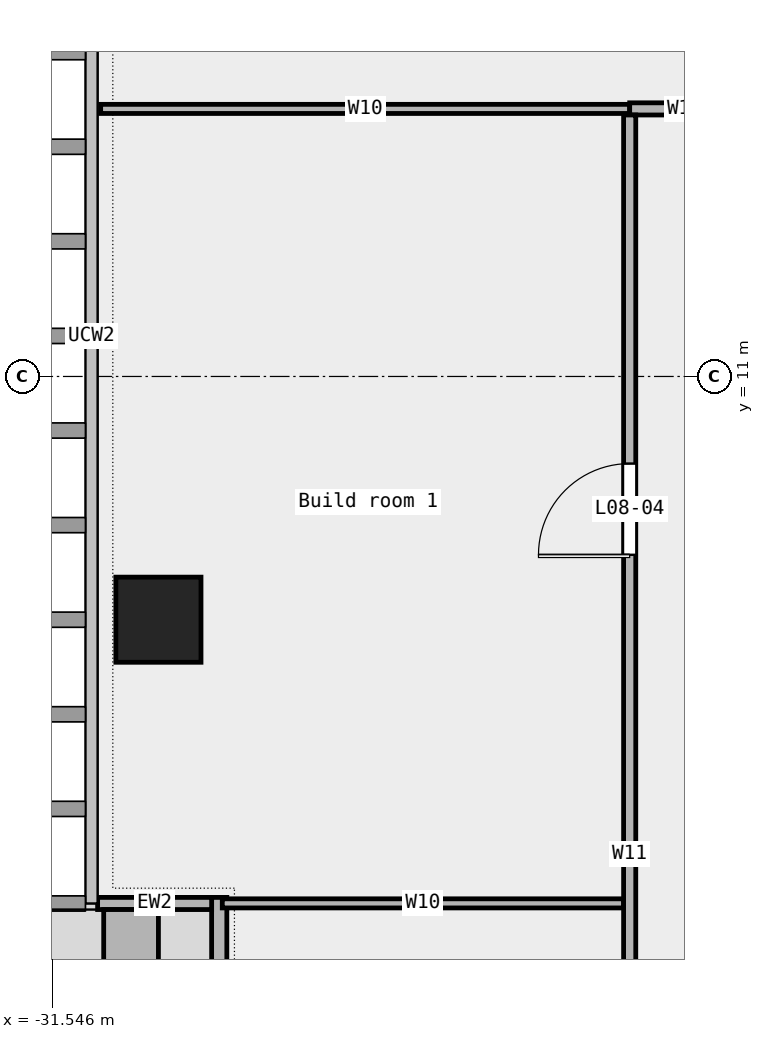
"""IFC4 building model, lengths in metres.
Left out: names, types, materials, properties, quantities, classifications, styles, units other than length and angle.
Written with IfcOpenShell. Run it as: python <this file> out.ifc"""

import sys

from ifc_helpers import new_model, si_unit, direction, frame, frame_2d, origin, origin_2d, place, context, subcontext, project, spatial, rectangle, extrude, element, fill, save


model = new_model("IFC4")
c1 = context("Model", 3, precision=1e-05, world=origin(), true_north=direction((0.0, 1.0)))
c2 = subcontext(c1, "Body", "Model", "MODEL_VIEW")
j1 = project(units=[si_unit("LENGTHUNIT", "METRE"), si_unit("PLANEANGLEUNIT", "RADIAN")], contexts=[c1])
p1 = place(None, origin())
s1 = spatial("IfcSite", under=j1, at=p1, CompositionType="ELEMENT")
p2 = place(p1, origin())
s2 = spatial("IfcBuilding", under=s1, at=p2, CompositionType="ELEMENT")
p3 = place(p2, frame((0.0, 0.0, 45.4)))
s3 = spatial("IfcBuildingStorey", under=s2, at=p3, CompositionType="ELEMENT", Elevation=45.4)
p4 = place(p3, frame((-29.8, 7.0, 0.0), z_axis=(0.0, 0.0, 1.0), x_axis=(1.0, 0.0, 0.0)))
e1 = element("IfcColumn", 1, at=p4, inside=s3, PredefinedType="COLUMN", context=c2, shape_type="SweptSolid", body=[
    extrude(rectangle(XDim=1.4, YDim=1.4, at=origin_2d()), origin(), (0.0, 0.0, 1.0), 4.35),
])
p5 = place(p3, frame((-28.8, 2.433, 0.0), z_axis=(0.0, 0.0, 1.0), x_axis=(0.0, -1.0, 0.0)))
e2 = element("IfcWall", 2, at=p5, inside=s3, PredefinedType="STANDARD", context=c2, shape_type="SweptSolid", body=[
    extrude(rectangle(XDim=14.2, YDim=0.25, at=frame_2d((7.1, 0.0))), origin(), (0.0, 0.0, 1.0), 4.35),
])
p6 = place(p5, frame((1.75, 0.0, 0.45)))
e3 = element("IfcOpeningElement", 3, at=p6, cuts=e2, PredefinedType="OPENING", context=c2, shape_type="SweptSolid", body=[
    extrude(rectangle(XDim=1.5, YDim=3.0, at=frame_2d((0.75, 1.5))), frame((0.0, 0.137, 0.0), z_axis=(0.0, -1.0, 0.0), x_axis=(1.0, 0.0, 0.0)), (0.0, 0.0, 1.0), 0.274),
])
p7 = place(p5, frame((6.25, 0.0, 0.0)))
e4 = element("IfcOpeningElement", 4, at=p7, cuts=e2, PredefinedType="OPENING", context=c2, shape_type="SweptSolid", body=[
    extrude(rectangle(XDim=1.8, YDim=2.4, at=frame_2d((0.9, 1.2))), frame((0.0, 0.137, 0.0), z_axis=(0.0, -1.0, 0.0), x_axis=(1.0, 0.0, 0.0)), (0.0, 0.0, 1.0), 0.274),
])
p8 = place(p5, frame((11.0, 0.0, 0.45)))
e5 = element("IfcOpeningElement", 5, at=p8, cuts=e2, PredefinedType="OPENING", context=c2, shape_type="SweptSolid", body=[
    extrude(rectangle(XDim=1.5, YDim=3.0, at=frame_2d((0.75, 1.5))), frame((0.0, 0.137, 0.0), z_axis=(0.0, -1.0, 0.0), x_axis=(1.0, 0.0, 0.0)), (0.0, 0.0, 1.0), 0.274),
])
p9 = place(p3, frame((-30.8, 2.333, 0.0), z_axis=(0.0, 0.0, 1.0), x_axis=(1.0, 0.0, 0.0)))
e6 = element("IfcWall", 6, at=p9, inside=s3, PredefinedType="STANDARD", context=c2, shape_type="SweptSolid", body=[
    extrude(rectangle(XDim=1.875, YDim=0.2, at=frame_2d((0.938, 0.0))), origin(), (0.0, 0.0, 1.0), 4.35),
])
p10 = place(p3, frame((-30.25, 2.233, 0.0), z_axis=(0.0, 0.0, 1.0), x_axis=(0.0, -1.0, 0.0)))
e7 = element("IfcWall", 7, at=p10, inside=s3, PredefinedType="STANDARD", context=c2, shape_type="SweptSolid", body=[
    extrude(rectangle(XDim=3.6, YDim=0.9, at=frame_2d((1.8, 0.0))), origin(), (0.0, 0.0, 1.0), 0.7),
])
p11 = place(p3, frame((-28.75, 2.335, 0.0), z_axis=(0.0, 0.0, 1.0), x_axis=(1.0, 0.0, 0.0)))
e8 = element("IfcWall", 8, at=p11, inside=s3, PredefinedType="PARTITIONING", context=c2, shape_type="SweptSolid", body=[
    extrude(rectangle(XDim=6.6, YDim=0.15, at=frame_2d((3.3, 0.0))), origin(), (0.0, 0.0, 1.0), 4.35),
])
p12 = place(p3, frame((-30.75, 15.4, 0.0), z_axis=(0.0, 0.0, 1.0), x_axis=(1.0, 0.0, 0.0)))
e9 = element("IfcWall", 9, at=p12, inside=s3, PredefinedType="PARTITIONING", context=c2, shape_type="SweptSolid", body=[
    extrude(rectangle(XDim=8.7, YDim=0.15, at=frame_2d((4.35, 0.0))), origin(), (0.0, 0.0, 1.0), 4.35),
])
p13 = place(p3, frame((-22.05, 15.4, 0.0), z_axis=(0.0, 0.0, 1.0), x_axis=(1.0, 0.0, 0.0)))
e10 = element("IfcWall", 10, at=p13, inside=s3, PredefinedType="PARTITIONING", context=c2, shape_type="SweptSolid", body=[
    extrude(rectangle(XDim=1.8, YDim=0.2, at=frame_2d((0.9, 0.0))), origin(), (0.0, 0.0, 1.0), 4.35),
])
p14 = place(p3, frame((-22.05, -9.0, 0.0), z_axis=(0.0, 0.0, 1.0), x_axis=(0.0, 1.0, 0.0)))
e11 = element("IfcWall", 11, at=p14, inside=s3, PredefinedType="PARTITIONING", context=c2, shape_type="SweptSolid", body=[
    extrude(rectangle(XDim=24.3, YDim=0.2, at=frame_2d((12.15, 0.0))), origin(), (0.0, 0.0, 1.0), 4.35),
])
p15 = place(p14, frame((17.067, 0.0, 0.0)))
e12 = element("IfcOpeningElement", 12, at=p15, cuts=e11, PredefinedType="OPENING", context=c2, shape_type="SweptSolid", body=[
    extrude(rectangle(XDim=1.5, YDim=2.1, at=frame_2d((0.75, 1.05))), frame((0.0, 0.112, 0.0), z_axis=(0.0, -1.0, 0.0), x_axis=(1.0, 0.0, 0.0)), (0.0, 0.0, 1.0), 0.224),
])
p16 = place(p14, frame((4.768, 0.0, 0.0)))
e13 = element("IfcOpeningElement", 13, at=p16, cuts=e11, PredefinedType="OPENING", context=c2, shape_type="SweptSolid", body=[
    extrude(rectangle(XDim=1.8, YDim=2.1, at=frame_2d((0.9, 1.05))), frame((0.0, 0.112, 0.0), z_axis=(0.0, -1.0, 0.0), x_axis=(1.0, 0.0, 0.0)), (0.0, 0.0, 1.0), 0.224),
])
p17 = place(p15, origin())
e14 = element("IfcDoor", 14, at=p17, inside=s3, OperationType="DOUBLE_DOOR_SINGLE_SWING", PredefinedType="DOOR", context=c2, shape_type="SweptSolid", body=[
    extrude(rectangle(XDim=1.5, YDim=2.1, at=frame_2d((0.75, 1.05))), frame((0.0, 0.025, 0.0), z_axis=(0.0, -1.0, 0.0), x_axis=(1.0, 0.0, 0.0)), (0.0, 0.0, 1.0), 0.05),
])
fill(e12, e14)
save(model, sys.argv[1])
